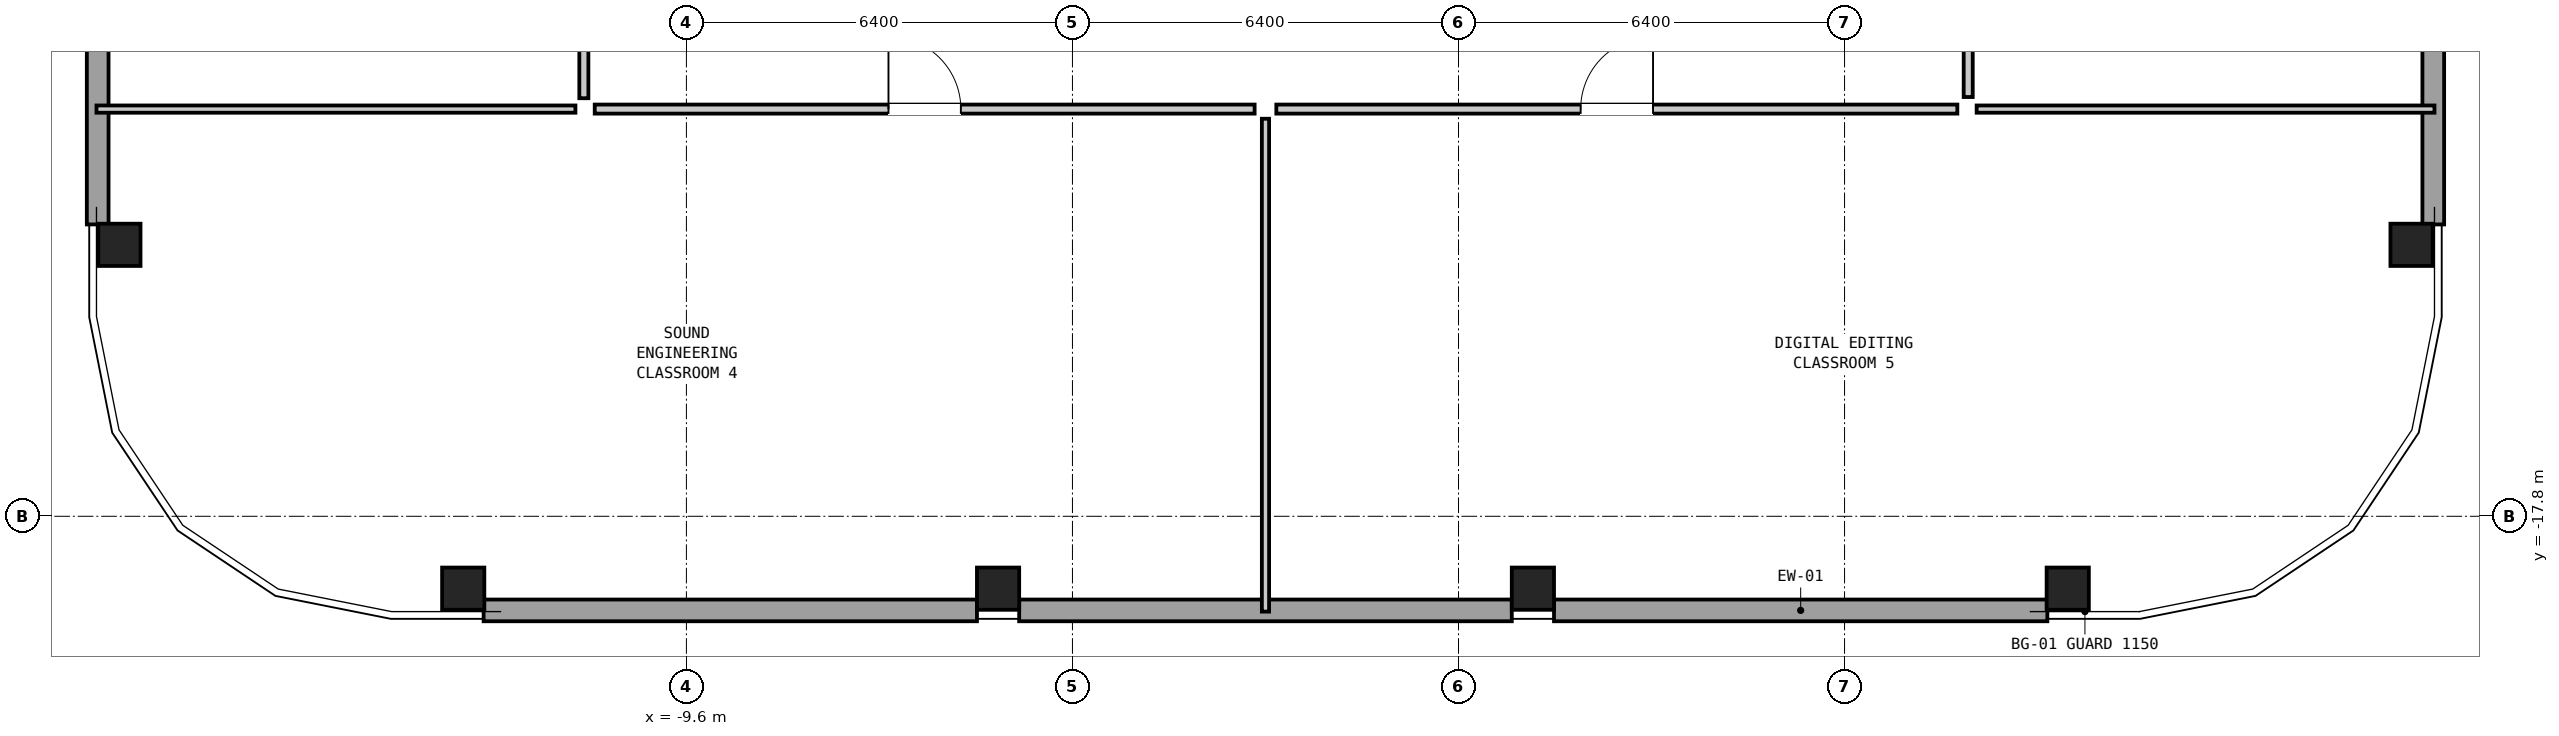
"""IFC4 building model, lengths in metres.
Left out: names, types, materials, properties, quantities, classifications, styles, units other than length and angle.
Written with IfcOpenShell. Run it as: python <this file> out.ifc"""

import sys

from ifc_helpers import new_model, si_unit, direction, frame, frame_2d, origin, origin_2d, place, context, subcontext, project, spatial, rectangle, hollow_rectangle, extrude, element, fill, save


model = new_model("IFC4")
c1 = context("Model", 3, precision=1e-05, world=origin(), true_north=direction((0.0, 1.0)))
c2 = subcontext(c1, "Body", "Model", "MODEL_VIEW")
j1 = project(units=[si_unit("LENGTHUNIT", "METRE"), si_unit("PLANEANGLEUNIT", "RADIAN")], contexts=[c1])
p1 = place(None, origin())
s1 = spatial("IfcSite", under=j1, at=p1, CompositionType="ELEMENT")
p2 = place(p1, origin())
s2 = spatial("IfcBuilding", under=s1, at=p2, CompositionType="ELEMENT")
p3 = place(p2, frame((0.0, 0.0, 223.9)))
s3 = spatial("IfcBuildingStorey", under=s2, at=p3, CompositionType="ELEMENT", Elevation=223.9)
for number, where, z_axis, x_axis in (
    (1, (-13.3, -19.0, 0.0), (0.0, 0.0, 1.0), (1.0, 0.0, 0.0)),
    (2, (-4.433, -19.0, 0.0), (0.0, 0.0, 1.0), (1.0, 0.0, 0.0)),
    (3, (4.433, -19.0, 0.0), (0.0, 0.0, 1.0), (1.0, 0.0, 0.0)),
    (4, (13.3, -19.0, 0.0), (0.0, 0.0, 1.0), (1.0, 0.0, 0.0)),
    (5, (19.0, -13.3, 0.0), (0.0, 0.0, 1.0), (0.0, 1.0, 0.0)),
    (6, (-19.0, -13.3, 0.0), (0.0, 0.0, 1.0), (0.0, 1.0, 0.0)),
):
    element("IfcColumn", number, at=place(p3, frame(where, z_axis=z_axis, x_axis=x_axis)), inside=s3, PredefinedType="COLUMN", context=c2, shape_type="SweptSolid", body=[
        extrude(hollow_rectangle(XDim=0.7, YDim=0.7, WallThickness=0.045, at=origin_2d()), origin(), (0.0, 0.0, 1.0), 3.05),
    ])
p4 = place(p3, frame((12.962, -19.36, 0.0), z_axis=(0.0, 0.0, 1.0), x_axis=(-1.0, 0.0, 0.0)))
e7 = element("IfcWall", 7, at=p4, inside=s3, PredefinedType="SOLIDWALL", context=c2, shape_type="SweptSolid", body=[
    extrude(rectangle(XDim=8.179, YDim=0.36, at=frame_2d((4.089, 0.0))), origin(), (0.0, 0.0, 1.0), 0.98),
])
p5 = place(p3, frame((4.083, -19.36, 0.0), z_axis=(0.0, 0.0, 1.0), x_axis=(-1.0, 0.0, 0.0)))
e8 = element("IfcWall", 8, at=p5, inside=s3, PredefinedType="SOLIDWALL", context=c2, shape_type="SweptSolid", body=[
    extrude(rectangle(XDim=8.167, YDim=0.36, at=frame_2d((4.083, 0.0))), origin(), (0.0, 0.0, 1.0), 0.98),
])
for number, where, z_axis, x_axis in (
    (9, (-4.783, -19.36, 0.0), (0.0, 0.0, 1.0), (-1.0, 0.0, 0.0)),
    (10, (19.36, -4.783, 0.0), (0.0, 0.0, 1.0), (0.0, -1.0, 0.0)),
    (11, (-19.36, -12.962, 0.0), (0.0, 0.0, 1.0), (0.0, 1.0, 0.0)),
):
    element("IfcWall", number, at=place(p3, frame(where, z_axis=z_axis, x_axis=x_axis)), inside=s3, PredefinedType="SOLIDWALL", context=c2, shape_type="SweptSolid", body=[
        extrude(rectangle(XDim=8.179, YDim=0.36, at=frame_2d((4.089, 0.0))), origin(), (0.0, 0.0, 1.0), 0.98),
    ])
p6 = place(p3, frame((-19.38, -11.05, 0.0), z_axis=(0.0, 0.0, 1.0), x_axis=(1.0, 0.0, 0.0)))
e12 = element("IfcWall", 12, at=p6, inside=s3, PredefinedType="PARTITIONING", context=c2, shape_type="SweptSolid", body=[
    extrude(rectangle(XDim=7.94, YDim=0.12, at=frame_2d((3.97, 0.0))), origin(), (0.0, 0.0, 1.0), 2.86),
])
p7 = place(p3, frame((11.79, -11.05, 0.0), z_axis=(0.0, 0.0, 1.0), x_axis=(1.0, 0.0, 0.0)))
e13 = element("IfcWall", 13, at=p7, inside=s3, PredefinedType="PARTITIONING", context=c2, shape_type="SweptSolid", body=[
    extrude(rectangle(XDim=7.59, YDim=0.12, at=frame_2d((3.795, 0.0))), origin(), (0.0, 0.0, 1.0), 2.86),
])
p8 = place(p3, frame((0.0, -19.38, 0.0), z_axis=(0.0, 0.0, 1.0), x_axis=(0.0, 1.0, 0.0)))
e14 = element("IfcWall", 14, at=p8, inside=s3, PredefinedType="PARTITIONING", context=c2, shape_type="SweptSolid", body=[
    extrude(rectangle(XDim=8.17, YDim=0.12, at=frame_2d((4.085, 0.0))), origin(), (0.0, 0.0, 1.0), 2.381),
])
p9 = place(p3, frame((-11.12, -11.05, 0.0), z_axis=(0.0, 0.0, 1.0), x_axis=(1.0, 0.0, 0.0)))
e15 = element("IfcWall", 15, at=p9, inside=s3, PredefinedType="PARTITIONING", context=c2, shape_type="SweptSolid", body=[
    extrude(rectangle(XDim=10.94, YDim=0.15, at=frame_2d((5.47, 0.0))), origin(), (0.0, 0.0, 1.0), 2.86),
])
p10 = place(p9, frame((4.87, 0.0, 0.0)))
e16 = element("IfcOpeningElement", 16, at=p10, cuts=e15, PredefinedType="OPENING", context=c2, shape_type="SweptSolid", body=[
    extrude(rectangle(XDim=1.2, YDim=2.1, at=frame_2d((0.6, 1.05))), frame((0.0, 0.087, 0.0), z_axis=(0.0, -1.0, 0.0), x_axis=(1.0, 0.0, 0.0)), (0.0, 0.0, 1.0), 0.174),
])
p11 = place(p3, frame((0.18, -11.05, 0.0), z_axis=(0.0, 0.0, 1.0), x_axis=(1.0, 0.0, 0.0)))
e17 = element("IfcWall", 17, at=p11, inside=s3, PredefinedType="PARTITIONING", context=c2, shape_type="SweptSolid", body=[
    extrude(rectangle(XDim=11.29, YDim=0.15, at=frame_2d((5.645, 0.0))), origin(), (0.0, 0.0, 1.0), 2.86),
])
p12 = place(p11, frame((5.045, 0.0, 0.0)))
e18 = element("IfcOpeningElement", 18, at=p12, cuts=e17, PredefinedType="OPENING", context=c2, shape_type="SweptSolid", body=[
    extrude(rectangle(XDim=1.2, YDim=2.1, at=frame_2d((0.6, 1.05))), frame((0.0, 0.087, 0.0), z_axis=(0.0, -1.0, 0.0), x_axis=(1.0, 0.0, 0.0)), (0.0, 0.0, 1.0), 0.174),
])
p13 = place(p3, frame((-11.3, -10.87, 0.0), z_axis=(0.0, 0.0, 1.0), x_axis=(0.0, 1.0, 0.0)))
e19 = element("IfcWall", 19, at=p13, inside=s3, PredefinedType="PARTITIONING", context=c2, shape_type="SweptSolid", body=[
    extrude(rectangle(XDim=10.69, YDim=0.15, at=frame_2d((5.345, 0.0))), origin(), (0.0, 0.0, 1.0), 2.86),
])
p14 = place(p13, frame((4.745, 0.0, 0.0)))
e20 = element("IfcOpeningElement", 20, at=p14, cuts=e19, PredefinedType="OPENING", context=c2, shape_type="SweptSolid", body=[
    extrude(rectangle(XDim=1.2, YDim=2.1, at=frame_2d((0.6, 1.05))), frame((0.0, 0.087, 0.0), z_axis=(0.0, -1.0, 0.0), x_axis=(1.0, 0.0, 0.0)), (0.0, 0.0, 1.0), 0.174),
])
p15 = place(p3, frame((11.65, -10.85, 0.0), z_axis=(0.0, 0.0, 1.0), x_axis=(0.0, 1.0, 0.0)))
e21 = element("IfcWall", 21, at=p15, inside=s3, PredefinedType="PARTITIONING", context=c2, shape_type="SweptSolid", body=[
    extrude(rectangle(XDim=8.29, YDim=0.15, at=frame_2d((4.145, 0.0))), origin(), (0.0, 0.0, 1.0), 2.86),
])
p16 = place(p15, frame((3.67, 0.0, 0.0)))
e22 = element("IfcOpeningElement", 22, at=p16, cuts=e21, PredefinedType="OPENING", context=c2, shape_type="SweptSolid", body=[
    extrude(rectangle(XDim=0.95, YDim=2.1, at=frame_2d((0.475, 1.05))), frame((0.0, 0.087, 0.0), z_axis=(0.0, -1.0, 0.0), x_axis=(1.0, 0.0, 0.0)), (0.0, 0.0, 1.0), 0.174),
])
p17 = place(p10, origin())
e23 = element("IfcDoor", 23, at=p17, inside=s3, OperationType="SINGLE_SWING_LEFT", PredefinedType="DOOR", context=c2, shape_type="SweptSolid", body=[
    extrude(rectangle(XDim=1.2, YDim=2.1, at=frame_2d((0.6, 1.05))), frame((0.0, 0.025, 0.0), z_axis=(0.0, -1.0, 0.0), x_axis=(1.0, 0.0, 0.0)), (0.0, 0.0, 1.0), 0.05),
])
fill(e16, e23)
p18 = place(p12, origin())
e24 = element("IfcDoor", 24, at=p18, inside=s3, OperationType="SINGLE_SWING_RIGHT", PredefinedType="DOOR", context=c2, shape_type="SweptSolid", body=[
    extrude(rectangle(XDim=1.2, YDim=2.1, at=frame_2d((0.6, 1.05))), frame((0.0, 0.025, 0.0), z_axis=(0.0, -1.0, 0.0), x_axis=(1.0, 0.0, 0.0)), (0.0, 0.0, 1.0), 0.05),
])
fill(e18, e24)
save(model, sys.argv[1])
